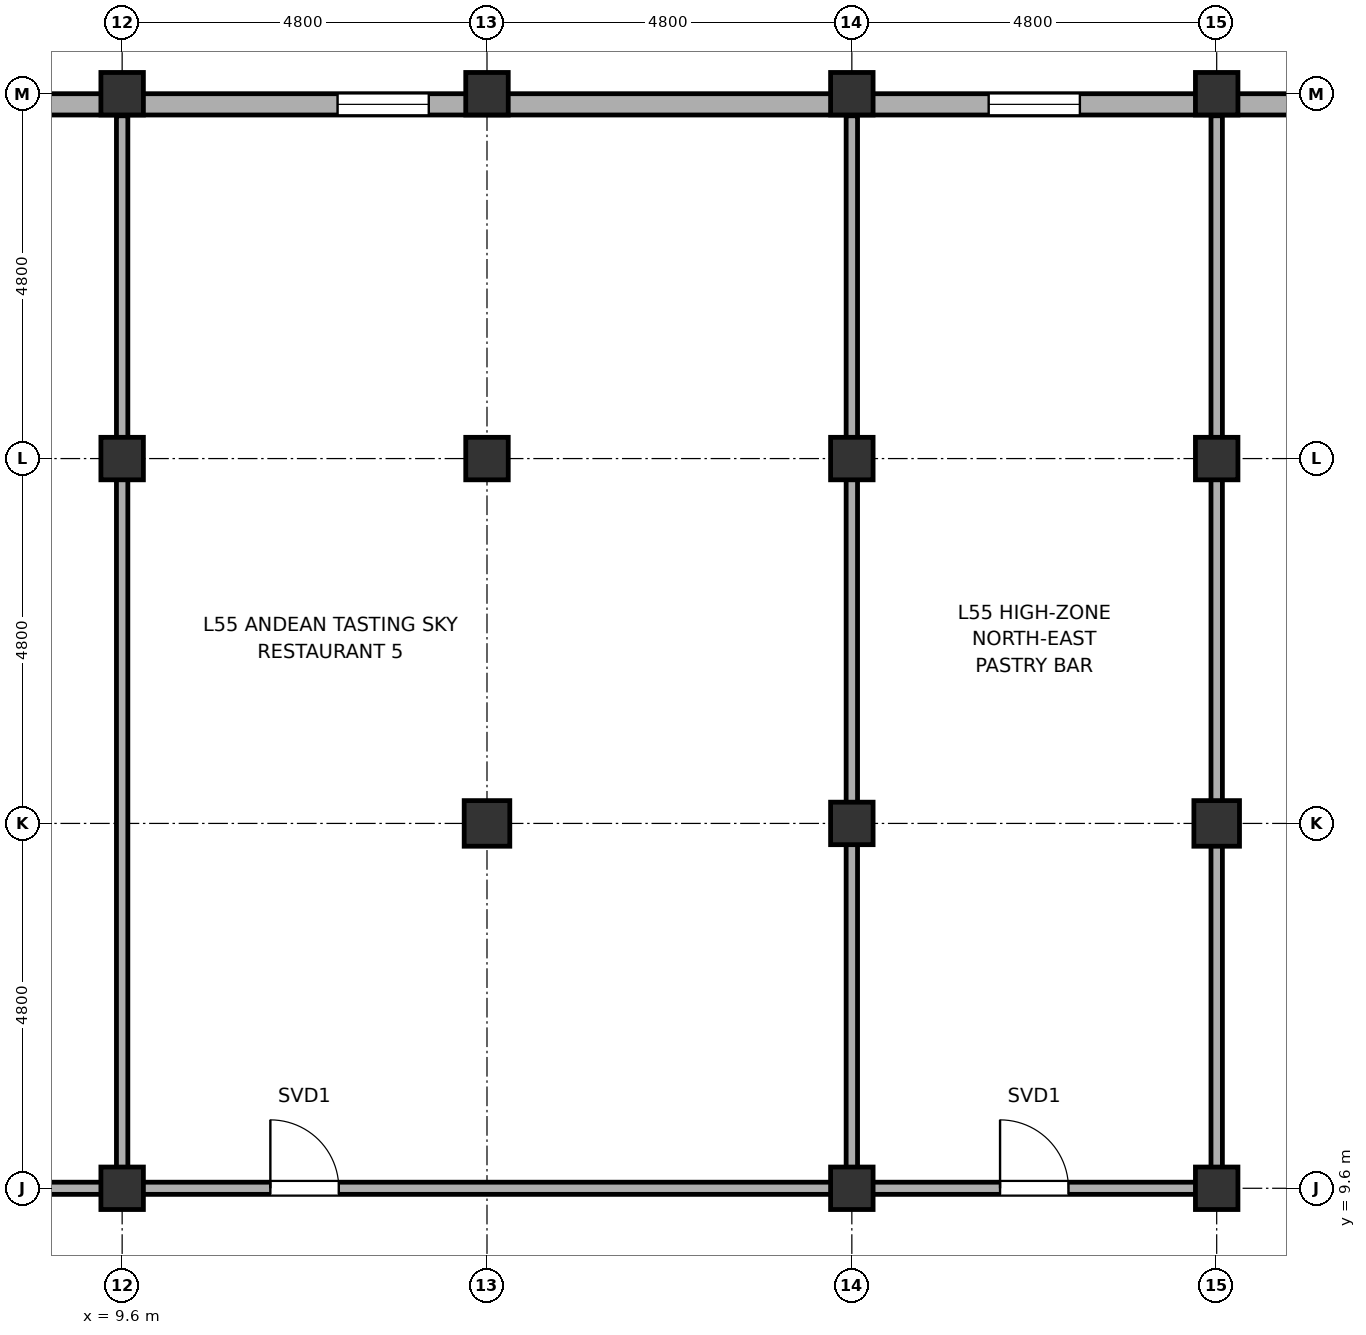
"""IFC4 building model, lengths in metres.
Left out: names, types, materials, properties, quantities, classifications, styles, units other than length and angle.
Written with IfcOpenShell. Run it as: python <this file> out.ifc"""

import sys

from ifc_helpers import new_model, si_unit, direction, frame, frame_2d, origin, origin_2d, place, context, subcontext, project, spatial, rectangle, hollow_rectangle, hollow_circle, extrude, element, fill, save


model = new_model("IFC4")
c1 = context("Model", 3, precision=1e-05, world=origin(), true_north=direction((0.0, 1.0)))
c2 = subcontext(c1, "Body", "Model", "MODEL_VIEW")
j1 = project(units=[si_unit("LENGTHUNIT", "METRE"), si_unit("PLANEANGLEUNIT", "RADIAN")], contexts=[c1])
p1 = place(None, origin())
s1 = spatial("IfcSite", under=j1, at=p1, CompositionType="ELEMENT")
p2 = place(p1, origin())
s2 = spatial("IfcBuilding", under=s1, at=p2, CompositionType="ELEMENT")
p3 = place(p2, frame((0.0, 0.0, 222.3)))
s3 = spatial("IfcBuildingStorey", under=s2, at=p3, CompositionType="ELEMENT", Elevation=222.3)
for number, where, z_axis, x_axis in (
    (1, (9.6, 9.6, 0.0), (0.0, 0.0, 1.0), (1.0, 0.0, 0.0)),
    (2, (9.6, 19.2, 0.0), (0.0, 0.0, 1.0), (1.0, 0.0, 0.0)),
):
    element("IfcColumn", number, at=place(p3, frame(where, z_axis=z_axis, x_axis=x_axis)), inside=s3, PredefinedType="COLUMN", context=c2, shape_type="SweptSolid", body=[
        extrude(hollow_circle(Radius=0.28, WallThickness=0.025, at=origin_2d()), origin(), (0.0, 0.0, 1.0), 3.85),
    ])
p4 = place(p3, frame((9.6, 24.0, -0.18), z_axis=(0.0, 0.0, 1.0), x_axis=(1.0, 0.0, 0.0)))
e3 = element("IfcColumn", 3, at=p4, inside=s3, PredefinedType="COLUMN", context=c2, shape_type="SweptSolid", body=[
    extrude(hollow_circle(Radius=0.28, WallThickness=0.025, at=origin_2d()), origin(), (0.0, 0.0, 1.0), 4.03),
])
p5 = place(p3, frame((14.4, 14.4, 0.0), z_axis=(0.0, 0.0, 1.0), x_axis=(1.0, 0.0, 0.0)))
e4 = element("IfcColumn", 4, at=p5, inside=s3, PredefinedType="COLUMN", context=c2, shape_type="SweptSolid", body=[
    extrude(hollow_rectangle(XDim=0.6, YDim=0.6, WallThickness=0.028, at=origin_2d()), origin(), (0.0, 0.0, 1.0), 3.85),
])
p6 = place(p3, frame((14.4, 19.2, 0.0), z_axis=(0.0, 0.0, 1.0), x_axis=(1.0, 0.0, 0.0)))
e5 = element("IfcColumn", 5, at=p6, inside=s3, PredefinedType="COLUMN", context=c2, shape_type="SweptSolid", body=[
    extrude(hollow_circle(Radius=0.28, WallThickness=0.025, at=origin_2d()), origin(), (0.0, 0.0, 1.0), 3.85),
])
p7 = place(p3, frame((14.4, 24.0, -0.18), z_axis=(0.0, 0.0, 1.0), x_axis=(1.0, 0.0, 0.0)))
e6 = element("IfcColumn", 6, at=p7, inside=s3, PredefinedType="COLUMN", context=c2, shape_type="SweptSolid", body=[
    extrude(hollow_circle(Radius=0.28, WallThickness=0.025, at=origin_2d()), origin(), (0.0, 0.0, 1.0), 4.03),
])
for number, where, z_axis, x_axis in (
    (7, (19.2, 9.6, 0.0), (0.0, 0.0, 1.0), (1.0, 0.0, 0.0)),
    (8, (19.2, 14.4, 0.0), (0.0, 0.0, 1.0), (1.0, 0.0, 0.0)),
    (9, (19.2, 19.2, 0.0), (0.0, 0.0, 1.0), (1.0, 0.0, 0.0)),
):
    element("IfcColumn", number, at=place(p3, frame(where, z_axis=z_axis, x_axis=x_axis)), inside=s3, PredefinedType="COLUMN", context=c2, shape_type="SweptSolid", body=[
        extrude(hollow_circle(Radius=0.28, WallThickness=0.025, at=origin_2d()), origin(), (0.0, 0.0, 1.0), 3.85),
    ])
p8 = place(p3, frame((19.2, 24.0, -0.18), z_axis=(0.0, 0.0, 1.0), x_axis=(1.0, 0.0, 0.0)))
e10 = element("IfcColumn", 10, at=p8, inside=s3, PredefinedType="COLUMN", context=c2, shape_type="SweptSolid", body=[
    extrude(hollow_circle(Radius=0.28, WallThickness=0.025, at=origin_2d()), origin(), (0.0, 0.0, 1.0), 4.03),
])
p9 = place(p3, frame((24.0, 9.6, 0.0), z_axis=(0.0, 0.0, 1.0), x_axis=(1.0, 0.0, 0.0)))
e11 = element("IfcColumn", 11, at=p9, inside=s3, PredefinedType="COLUMN", context=c2, shape_type="SweptSolid", body=[
    extrude(hollow_circle(Radius=0.28, WallThickness=0.025, at=origin_2d()), origin(), (0.0, 0.0, 1.0), 3.85),
])
p10 = place(p3, frame((24.0, 14.4, 0.0), z_axis=(0.0, 0.0, 1.0), x_axis=(1.0, 0.0, 0.0)))
e12 = element("IfcColumn", 12, at=p10, inside=s3, PredefinedType="COLUMN", context=c2, shape_type="SweptSolid", body=[
    extrude(hollow_rectangle(XDim=0.6, YDim=0.6, WallThickness=0.028, at=origin_2d()), origin(), (0.0, 0.0, 1.0), 3.85),
])
p11 = place(p3, frame((24.0, 19.2, 0.0), z_axis=(0.0, 0.0, 1.0), x_axis=(1.0, 0.0, 0.0)))
e13 = element("IfcColumn", 13, at=p11, inside=s3, PredefinedType="COLUMN", context=c2, shape_type="SweptSolid", body=[
    extrude(hollow_circle(Radius=0.28, WallThickness=0.025, at=origin_2d()), origin(), (0.0, 0.0, 1.0), 3.85),
])
p12 = place(p3, frame((24.0, 24.0, -0.18), z_axis=(0.0, 0.0, 1.0), x_axis=(1.0, 0.0, 0.0)))
e14 = element("IfcColumn", 14, at=p12, inside=s3, PredefinedType="COLUMN", context=c2, shape_type="SweptSolid", body=[
    extrude(hollow_circle(Radius=0.28, WallThickness=0.025, at=origin_2d()), origin(), (0.0, 0.0, 1.0), 4.03),
])
p13 = place(p3, frame((4.75, 23.86, 0.0), z_axis=(0.0, 0.0, 1.0), x_axis=(1.0, 0.0, 0.0)))
e15 = element("IfcWall", 15, at=p13, inside=s3, PredefinedType="SOLIDWALL", context=c2, shape_type="SweptSolid", body=[
    extrude(rectangle(XDim=25.25, YDim=0.28, at=frame_2d((12.625, 0.0))), origin(), (0.0, 0.0, 1.0), 2.27),
])
p14 = place(p13, frame((16.25, 0.0, 0.75)))
e16 = element("IfcOpeningElement", 16, at=p14, cuts=e15, PredefinedType="OPENING", context=c2, shape_type="SweptSolid", body=[
    extrude(rectangle(XDim=1.2, YDim=1.15, at=frame_2d((0.6, 0.575))), frame((0.0, 0.155, 0.0), z_axis=(0.0, -1.0, 0.0), x_axis=(1.0, 0.0, 0.0)), (0.0, 0.0, 1.0), 0.31),
])
p15 = place(p13, frame((7.684, 0.0, 0.75)))
e17 = element("IfcOpeningElement", 17, at=p15, cuts=e15, PredefinedType="OPENING", context=c2, shape_type="SweptSolid", body=[
    extrude(rectangle(XDim=1.2, YDim=1.15, at=frame_2d((0.6, 0.575))), frame((0.0, 0.155, 0.0), z_axis=(0.0, -1.0, 0.0), x_axis=(1.0, 0.0, 0.0)), (0.0, 0.0, 1.0), 0.31),
])
p16 = place(p3, frame((-23.92, 9.6, 0.0), z_axis=(0.0, 0.0, 1.0), x_axis=(1.0, 0.0, 0.0)))
e18 = element("IfcWall", 18, at=p16, inside=s3, PredefinedType="PARTITIONING", context=c2, shape_type="SweptSolid", body=[
    extrude(rectangle(XDim=47.84, YDim=0.16, at=frame_2d((23.92, 0.0))), origin(), (0.0, 0.0, 1.0), 2.27),
])
p17 = place(p16, frame((1.87, 0.0, 0.0)))
e19 = element("IfcOpeningElement", 19, at=p17, cuts=e18, PredefinedType="OPENING", context=c2, shape_type="SweptSolid", body=[
    extrude(rectangle(XDim=0.9, YDim=2.1, at=frame_2d((0.45, 1.05))), frame((0.0, 0.095, 0.0), z_axis=(0.0, -1.0, 0.0), x_axis=(1.0, 0.0, 0.0)), (0.0, 0.0, 1.0), 0.19),
])
p18 = place(p16, frame((45.07, 0.0, 0.0)))
e20 = element("IfcOpeningElement", 20, at=p18, cuts=e18, PredefinedType="OPENING", context=c2, shape_type="SweptSolid", body=[
    extrude(rectangle(XDim=0.9, YDim=2.1, at=frame_2d((0.45, 1.05))), frame((0.0, 0.095, 0.0), z_axis=(0.0, -1.0, 0.0), x_axis=(1.0, 0.0, 0.0)), (0.0, 0.0, 1.0), 0.19),
])
p19 = place(p16, frame((5.98, 0.0, 0.0)))
e21 = element("IfcOpeningElement", 21, at=p19, cuts=e18, PredefinedType="OPENING", context=c2, shape_type="SweptSolid", body=[
    extrude(rectangle(XDim=0.9, YDim=2.1, at=frame_2d((0.45, 1.05))), frame((0.0, 0.095, 0.0), z_axis=(0.0, -1.0, 0.0), x_axis=(1.0, 0.0, 0.0)), (0.0, 0.0, 1.0), 0.19),
])
p20 = place(p16, frame((7.87, 0.0, 0.0)))
e22 = element("IfcOpeningElement", 22, at=p20, cuts=e18, PredefinedType="OPENING", context=c2, shape_type="SweptSolid", body=[
    extrude(rectangle(XDim=0.9, YDim=2.1, at=frame_2d((0.45, 1.05))), frame((0.0, 0.095, 0.0), z_axis=(0.0, -1.0, 0.0), x_axis=(1.0, 0.0, 0.0)), (0.0, 0.0, 1.0), 0.19),
])
p21 = place(p16, frame((10.395, 0.0, 0.0)))
e23 = element("IfcOpeningElement", 23, at=p21, cuts=e18, PredefinedType="OPENING", context=c2, shape_type="SweptSolid", body=[
    extrude(rectangle(XDim=0.92, YDim=2.15, at=frame_2d((0.46, 1.075))), frame((0.0, 0.095, 0.0), z_axis=(0.0, -1.0, 0.0), x_axis=(1.0, 0.0, 0.0)), (0.0, 0.0, 1.0), 0.19),
])
p22 = place(p16, frame((17.325, 0.0, 0.0)))
e24 = element("IfcOpeningElement", 24, at=p22, cuts=e18, PredefinedType="OPENING", context=c2, shape_type="SweptSolid", body=[
    extrude(rectangle(XDim=0.92, YDim=2.15, at=frame_2d((0.46, 1.075))), frame((0.0, 0.095, 0.0), z_axis=(0.0, -1.0, 0.0), x_axis=(1.0, 0.0, 0.0)), (0.0, 0.0, 1.0), 0.19),
])
p23 = place(p16, frame((21.07, 0.0, 0.0)))
e25 = element("IfcOpeningElement", 25, at=p23, cuts=e18, PredefinedType="OPENING", context=c2, shape_type="SweptSolid", body=[
    extrude(rectangle(XDim=0.9, YDim=2.1, at=frame_2d((0.45, 1.05))), frame((0.0, 0.095, 0.0), z_axis=(0.0, -1.0, 0.0), x_axis=(1.0, 0.0, 0.0)), (0.0, 0.0, 1.0), 0.19),
])
p24 = place(p16, frame((35.47, 0.0, 0.0)))
e26 = element("IfcOpeningElement", 26, at=p24, cuts=e18, PredefinedType="OPENING", context=c2, shape_type="SweptSolid", body=[
    extrude(rectangle(XDim=0.9, YDim=2.1, at=frame_2d((0.45, 1.05))), frame((0.0, 0.095, 0.0), z_axis=(0.0, -1.0, 0.0), x_axis=(1.0, 0.0, 0.0)), (0.0, 0.0, 1.0), 0.19),
])
for number, where, z_axis, x_axis in (
    (27, (9.6, 9.72, 0.0), (0.0, 0.0, 1.0), (0.0, 1.0, 0.0)),
    (28, (19.2, 9.72, 0.0), (0.0, 0.0, 1.0), (0.0, 1.0, 0.0)),
    (29, (24.0, 9.72, 0.0), (0.0, 0.0, 1.0), (0.0, 1.0, 0.0)),
):
    element("IfcWall", number, at=place(p3, frame(where, z_axis=z_axis, x_axis=x_axis)), inside=s3, PredefinedType="PARTITIONING", context=c2, shape_type="SweptSolid", body=[
        extrude(rectangle(XDim=13.99, YDim=0.15, at=frame_2d((6.995, 0.0))), origin(), (0.0, 0.0, 1.0), 2.27),
    ])
p25 = place(p14, origin())
e30 = element("IfcWindow", 30, at=p25, inside=s3, PartitioningType="SINGLE_PANEL", PredefinedType="WINDOW", context=c2, shape_type="SweptSolid", body=[
    extrude(rectangle(XDim=1.2, YDim=1.15, at=frame_2d((0.6, 0.575))), frame((0.0, 0.03, 0.0), z_axis=(0.0, -1.0, 0.0), x_axis=(1.0, 0.0, 0.0)), (0.0, 0.0, 1.0), 0.06),
])
fill(e16, e30)
p26 = place(p15, origin())
e31 = element("IfcWindow", 31, at=p26, inside=s3, PartitioningType="SINGLE_PANEL", PredefinedType="WINDOW", context=c2, shape_type="SweptSolid", body=[
    extrude(rectangle(XDim=1.2, YDim=1.15, at=frame_2d((0.6, 0.575))), frame((0.0, 0.03, 0.0), z_axis=(0.0, -1.0, 0.0), x_axis=(1.0, 0.0, 0.0)), (0.0, 0.0, 1.0), 0.06),
])
fill(e17, e31)
p27 = place(p18, origin())
e32 = element("IfcDoor", 32, at=p27, inside=s3, OperationType="SINGLE_SWING_RIGHT", PredefinedType="DOOR", context=c2, shape_type="SweptSolid", body=[
    extrude(rectangle(XDim=0.9, YDim=2.1, at=frame_2d((0.45, 1.05))), frame((0.0, 0.025, 0.0), z_axis=(0.0, -1.0, 0.0), x_axis=(1.0, 0.0, 0.0)), (0.0, 0.0, 1.0), 0.05),
])
fill(e20, e32)
p28 = place(p24, origin())
e33 = element("IfcDoor", 33, at=p28, inside=s3, OperationType="SINGLE_SWING_LEFT", PredefinedType="DOOR", context=c2, shape_type="SweptSolid", body=[
    extrude(rectangle(XDim=0.9, YDim=2.1, at=frame_2d((0.45, 1.05))), frame((0.0, 0.025, 0.0), z_axis=(0.0, -1.0, 0.0), x_axis=(1.0, 0.0, 0.0)), (0.0, 0.0, 1.0), 0.05),
])
fill(e26, e33)
save(model, sys.argv[1])
